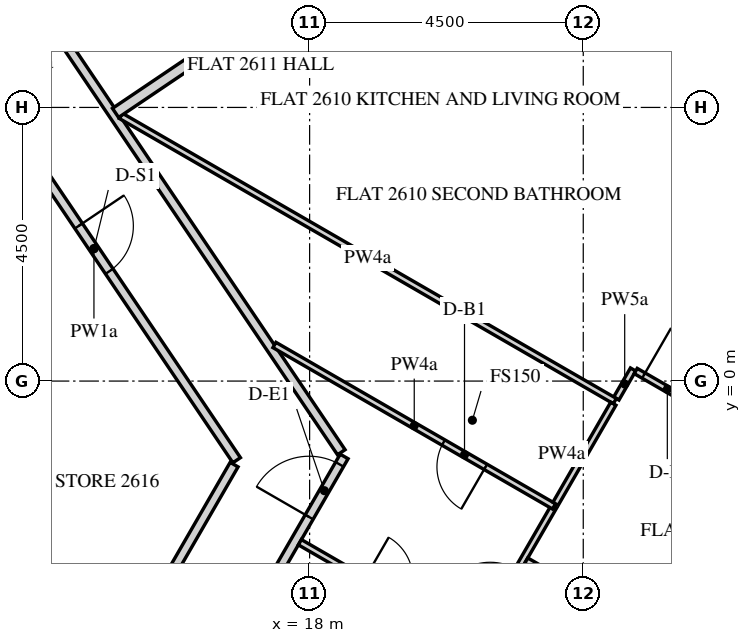
"""IFC4 building model, lengths in metres.
Left out: names, types, materials, properties, quantities, classifications, styles, units other than length and angle.
Written with IfcOpenShell. Run it as: python <this file> out.ifc"""

import sys

from ifc_helpers import new_model, si_unit, direction, frame, frame_2d, origin, place, context, subcontext, project, spatial, polyline, rectangle, outline, extrude, element, fill, save


model = new_model("IFC4")
c1 = context("Model", 3, precision=1e-05, world=origin(), true_north=direction((0.0, 1.0)))
c2 = subcontext(c1, "Body", "Model", "MODEL_VIEW")
j1 = project(units=[si_unit("LENGTHUNIT", "METRE"), si_unit("PLANEANGLEUNIT", "RADIAN")], contexts=[c1])
p1 = place(None, origin())
s1 = spatial("IfcSite", under=j1, at=p1, CompositionType="ELEMENT")
p2 = place(p1, origin())
s2 = spatial("IfcBuilding", under=s1, at=p2, CompositionType="ELEMENT")
p3 = place(p2, frame((0.0, 0.0, 326.4)))
s3 = spatial("IfcBuildingStorey", under=s2, at=p3, CompositionType="ELEMENT", Elevation=326.4)
p4 = place(p3, frame((16.451, -23.005, -0.15), z_axis=(0.0, 0.0, 1.0), x_axis=(0.500003737743, 0.866023245787, 0.0)))
e1 = element("IfcWall", 1, at=p4, inside=s3, PredefinedType="SOLIDWALL", context=c2, shape_type="SweptSolid", body=[
    extrude(outline(polyline([(-0.021, -0.25), (25.468, -0.25), (25.421, 0.25), (0.021, 0.25), (-0.021, -0.25)])), origin(), (0.0, 0.0, 1.0), 3.9),
])
p5 = place(p4, frame((2.522, 0.0, 0.75)))
e2 = element("IfcOpeningElement", 2, at=p5, cuts=e1, PredefinedType="OPENING", context=c2, shape_type="SweptSolid", body=[
    extrude(rectangle(XDim=2.4, YDim=2.7, at=frame_2d((1.2, 1.35))), frame((0.0, 0.26, 0.0), z_axis=(0.0, -1.0, 0.0), x_axis=(1.0, 0.0, 0.0)), (0.0, 0.0, 1.0), 0.52),
])
p6 = place(p4, frame((6.122, 0.0, 0.75)))
e3 = element("IfcOpeningElement", 3, at=p6, cuts=e1, PredefinedType="OPENING", context=c2, shape_type="SweptSolid", body=[
    extrude(rectangle(XDim=2.4, YDim=2.7, at=frame_2d((1.2, 1.35))), frame((0.0, 0.26, 0.0), z_axis=(0.0, -1.0, 0.0), x_axis=(1.0, 0.0, 0.0)), (0.0, 0.0, 1.0), 0.52),
])
p7 = place(p4, frame((9.722, 0.0, 0.75)))
e4 = element("IfcOpeningElement", 4, at=p7, cuts=e1, PredefinedType="OPENING", context=c2, shape_type="SweptSolid", body=[
    extrude(rectangle(XDim=2.4, YDim=2.7, at=frame_2d((1.2, 1.35))), frame((0.0, 0.26, 0.0), z_axis=(0.0, -1.0, 0.0), x_axis=(1.0, 0.0, 0.0)), (0.0, 0.0, 1.0), 0.52),
])
p8 = place(p4, frame((13.323, 0.0, 0.75)))
e5 = element("IfcOpeningElement", 5, at=p8, cuts=e1, PredefinedType="OPENING", context=c2, shape_type="SweptSolid", body=[
    extrude(rectangle(XDim=2.4, YDim=2.7, at=frame_2d((1.2, 1.35))), frame((0.0, 0.26, 0.0), z_axis=(0.0, -1.0, 0.0), x_axis=(1.0, 0.0, 0.0)), (0.0, 0.0, 1.0), 0.52),
])
p9 = place(p4, frame((16.922, 0.0, 0.75)))
e6 = element("IfcOpeningElement", 6, at=p9, cuts=e1, PredefinedType="OPENING", context=c2, shape_type="SweptSolid", body=[
    extrude(rectangle(XDim=2.4, YDim=2.7, at=frame_2d((1.2, 1.35))), frame((0.0, 0.26, 0.0), z_axis=(0.0, -1.0, 0.0), x_axis=(1.0, 0.0, 0.0)), (0.0, 0.0, 1.0), 0.52),
])
p10 = place(p4, frame((20.522, 0.0, 0.75)))
e7 = element("IfcOpeningElement", 7, at=p10, cuts=e1, PredefinedType="OPENING", context=c2, shape_type="SweptSolid", body=[
    extrude(rectangle(XDim=2.4, YDim=2.7, at=frame_2d((1.2, 1.35))), frame((0.0, 0.26, 0.0), z_axis=(0.0, -1.0, 0.0), x_axis=(1.0, 0.0, 0.0)), (0.0, 0.0, 1.0), 0.52),
])
p11 = place(p3, frame((26.706, 2.879, -0.15), z_axis=(0.0, 0.0, 1.0), x_axis=(-0.559197891507, 0.829034208061, 0.0)))
e8 = element("IfcWall", 8, at=p11, inside=s3, PredefinedType="SOLIDWALL", context=c2, shape_type="SweptSolid", body=[
    extrude(outline(polyline([(0.25, -0.25), (22.795, -0.25), (23.295, 0.25), (-0.25, 0.25), (0.25, -0.25)])), origin(), (0.0, 0.0, 1.0), 3.9),
])
p12 = place(p11, frame((1.323, 0.0, 1.05)))
e9 = element("IfcOpeningElement", 9, at=p12, cuts=e8, PredefinedType="OPENING", context=c2, shape_type="SweptSolid", body=[
    extrude(rectangle(XDim=0.9, YDim=1.5, at=frame_2d((0.45, 0.75))), frame((0.0, 0.26, 0.0), z_axis=(0.0, -1.0, 0.0), x_axis=(1.0, 0.0, 0.0)), (0.0, 0.0, 1.0), 0.52),
])
p13 = place(p11, frame((2.522, 0.0, 0.15)))
e10 = element("IfcOpeningElement", 10, at=p13, cuts=e8, PredefinedType="OPENING", context=c2, shape_type="SweptSolid", body=[
    extrude(rectangle(XDim=1.2, YDim=2.4, at=frame_2d((0.6, 1.2))), frame((0.0, 0.26, 0.0), z_axis=(0.0, -1.0, 0.0), x_axis=(1.0, 0.0, 0.0)), (0.0, 0.0, 1.0), 0.52),
])
p14 = place(p11, frame((4.922, 0.0, 1.05)))
e11 = element("IfcOpeningElement", 11, at=p14, cuts=e8, PredefinedType="OPENING", context=c2, shape_type="SweptSolid", body=[
    extrude(rectangle(XDim=0.9, YDim=1.5, at=frame_2d((0.45, 0.75))), frame((0.0, 0.26, 0.0), z_axis=(0.0, -1.0, 0.0), x_axis=(1.0, 0.0, 0.0)), (0.0, 0.0, 1.0), 0.52),
])
p15 = place(p11, frame((6.122, 0.0, 0.15)))
e12 = element("IfcOpeningElement", 12, at=p15, cuts=e8, PredefinedType="OPENING", context=c2, shape_type="SweptSolid", body=[
    extrude(rectangle(XDim=1.2, YDim=2.4, at=frame_2d((0.6, 1.2))), frame((0.0, 0.26, 0.0), z_axis=(0.0, -1.0, 0.0), x_axis=(1.0, 0.0, 0.0)), (0.0, 0.0, 1.0), 0.52),
])
p16 = place(p11, frame((8.522, 0.0, 1.05)))
e13 = element("IfcOpeningElement", 13, at=p16, cuts=e8, PredefinedType="OPENING", context=c2, shape_type="SweptSolid", body=[
    extrude(rectangle(XDim=0.9, YDim=1.5, at=frame_2d((0.45, 0.75))), frame((0.0, 0.26, 0.0), z_axis=(0.0, -1.0, 0.0), x_axis=(1.0, 0.0, 0.0)), (0.0, 0.0, 1.0), 0.52),
])
p17 = place(p11, frame((9.722, 0.0, 0.15)))
e14 = element("IfcOpeningElement", 14, at=p17, cuts=e8, PredefinedType="OPENING", context=c2, shape_type="SweptSolid", body=[
    extrude(rectangle(XDim=1.2, YDim=2.4, at=frame_2d((0.6, 1.2))), frame((0.0, 0.26, 0.0), z_axis=(0.0, -1.0, 0.0), x_axis=(1.0, 0.0, 0.0)), (0.0, 0.0, 1.0), 0.52),
])
p18 = place(p11, frame((12.122, 0.0, 1.05)))
e15 = element("IfcOpeningElement", 15, at=p18, cuts=e8, PredefinedType="OPENING", context=c2, shape_type="SweptSolid", body=[
    extrude(rectangle(XDim=0.9, YDim=1.5, at=frame_2d((0.45, 0.75))), frame((0.0, 0.26, 0.0), z_axis=(0.0, -1.0, 0.0), x_axis=(1.0, 0.0, 0.0)), (0.0, 0.0, 1.0), 0.52),
])
p19 = place(p11, frame((13.323, 0.0, 0.15)))
e16 = element("IfcOpeningElement", 16, at=p19, cuts=e8, PredefinedType="OPENING", context=c2, shape_type="SweptSolid", body=[
    extrude(rectangle(XDim=1.2, YDim=2.4, at=frame_2d((0.6, 1.2))), frame((0.0, 0.26, 0.0), z_axis=(0.0, -1.0, 0.0), x_axis=(1.0, 0.0, 0.0)), (0.0, 0.0, 1.0), 0.52),
])
p20 = place(p11, frame((15.722, 0.0, 1.05)))
e17 = element("IfcOpeningElement", 17, at=p20, cuts=e8, PredefinedType="OPENING", context=c2, shape_type="SweptSolid", body=[
    extrude(rectangle(XDim=0.9, YDim=1.5, at=frame_2d((0.45, 0.75))), frame((0.0, 0.26, 0.0), z_axis=(0.0, -1.0, 0.0), x_axis=(1.0, 0.0, 0.0)), (0.0, 0.0, 1.0), 0.52),
])
p21 = place(p11, frame((16.922, 0.0, 0.15)))
e18 = element("IfcOpeningElement", 18, at=p21, cuts=e8, PredefinedType="OPENING", context=c2, shape_type="SweptSolid", body=[
    extrude(rectangle(XDim=1.2, YDim=2.4, at=frame_2d((0.6, 1.2))), frame((0.0, 0.26, 0.0), z_axis=(0.0, -1.0, 0.0), x_axis=(1.0, 0.0, 0.0)), (0.0, 0.0, 1.0), 0.52),
])
p22 = place(p11, frame((19.323, 0.0, 1.05)))
e19 = element("IfcOpeningElement", 19, at=p22, cuts=e8, PredefinedType="OPENING", context=c2, shape_type="SweptSolid", body=[
    extrude(rectangle(XDim=0.9, YDim=1.5, at=frame_2d((0.45, 0.75))), frame((0.0, 0.26, 0.0), z_axis=(0.0, -1.0, 0.0), x_axis=(1.0, 0.0, 0.0)), (0.0, 0.0, 1.0), 0.52),
])
p23 = place(p11, frame((20.522, 0.0, 0.15)))
e20 = element("IfcOpeningElement", 20, at=p23, cuts=e8, PredefinedType="OPENING", context=c2, shape_type="SweptSolid", body=[
    extrude(rectangle(XDim=1.2, YDim=2.4, at=frame_2d((0.6, 1.2))), frame((0.0, 0.26, 0.0), z_axis=(0.0, -1.0, 0.0), x_axis=(1.0, 0.0, 0.0)), (0.0, 0.0, 1.0), 0.52),
])
p24 = place(p3, frame((11.229, -13.951, 0.0), z_axis=(0.0, 0.0, 1.0), x_axis=(0.499997948852, 0.866026588012, 0.0)))
e21 = element("IfcWall", 21, at=p24, inside=s3, PredefinedType="PARTITIONING", context=c2, shape_type="SweptSolid", body=[
    extrude(rectangle(XDim=14.677, YDim=0.15, at=frame_2d((7.339, 0.0))), origin(), (0.0, 0.0, 1.0), 2.838),
])
p25 = place(p24, frame((0.4, 0.0, 0.0)))
e22 = element("IfcOpeningElement", 22, at=p25, cuts=e21, PredefinedType="OPENING", context=c2, shape_type="SweptSolid", body=[
    extrude(rectangle(XDim=1.0, YDim=2.1, at=frame_2d((0.5, 1.05))), frame((0.0, 0.085, 0.0), z_axis=(0.0, -1.0, 0.0), x_axis=(1.0, 0.0, 0.0)), (0.0, 0.0, 1.0), 0.17),
])
p26 = place(p24, frame((13.527, 0.0, 0.0)))
e23 = element("IfcOpeningElement", 23, at=p26, cuts=e21, PredefinedType="OPENING", context=c2, shape_type="SweptSolid", body=[
    extrude(rectangle(XDim=1.0, YDim=2.1, at=frame_2d((0.5, 1.05))), frame((0.0, 0.085, 0.0), z_axis=(0.0, -1.0, 0.0), x_axis=(1.0, 0.0, 0.0)), (0.0, 0.0, 1.0), 0.17),
])
p27 = place(p3, frame((18.521, -1.171, 0.0), z_axis=(0.0, 0.0, 1.0), x_axis=(-0.559191021435, 0.829038842001, 0.0)))
e24 = element("IfcWall", 24, at=p27, inside=s3, PredefinedType="PARTITIONING", context=c2, shape_type="SweptSolid", body=[
    extrude(rectangle(XDim=16.605, YDim=0.15, at=frame_2d((8.303, 0.0))), origin(), (0.0, 0.0, 1.0), 2.838),
])
p28 = place(p27, frame((9.703, 0.0, 0.0)))
e25 = element("IfcOpeningElement", 25, at=p28, cuts=e24, PredefinedType="OPENING", context=c2, shape_type="SweptSolid", body=[
    extrude(rectangle(XDim=1.0, YDim=2.1, at=frame_2d((0.5, 1.05))), frame((0.0, 0.085, 0.0), z_axis=(0.0, -1.0, 0.0), x_axis=(1.0, 0.0, 0.0)), (0.0, 0.0, 1.0), 0.17),
])
p29 = place(p3, frame((12.106, 5.657, 0.0), z_axis=(0.0, 0.0, 1.0), x_axis=(0.559202573837, -0.829031049728, 0.0)))
e26 = element("IfcWall", 26, at=p29, inside=s3, PredefinedType="PARTITIONING", context=c2, shape_type="SweptSolid", body=[
    extrude(rectangle(XDim=8.394, YDim=0.15, at=frame_2d((4.197, 0.0))), origin(), (0.0, 0.0, 1.0), 2.838),
])
p30 = place(p29, frame((3.747, 0.0, 0.0)))
e27 = element("IfcOpeningElement", 27, at=p30, cuts=e26, PredefinedType="OPENING", context=c2, shape_type="SweptSolid", body=[
    extrude(rectangle(XDim=0.9, YDim=2.1, at=frame_2d((0.45, 1.05))), frame((0.0, 0.085, 0.0), z_axis=(0.0, -1.0, 0.0), x_axis=(1.0, 0.0, 0.0)), (0.0, 0.0, 1.0), 0.17),
])
p31 = place(p3, frame((16.758, -1.374, 0.0), z_axis=(0.0, 0.0, 1.0), x_axis=(-0.499980689202, -0.866036552592, 0.0)))
e28 = element("IfcWall", 28, at=p31, inside=s3, PredefinedType="PARTITIONING", context=c2, shape_type="SweptSolid", body=[
    extrude(rectangle(XDim=6.111, YDim=0.15, at=frame_2d((3.055, 0.0))), origin(), (0.0, 0.0, 1.0), 2.838),
])
p32 = place(p3, frame((23.043, -0.287, 0.0), z_axis=(0.0, 0.0, 1.0), x_axis=(0.500181810019, 0.865920410272, 0.0)))
e29 = element("IfcWall", 29, at=p32, inside=s3, PredefinedType="PARTITIONING", context=c2, shape_type="SweptSolid", body=[
    extrude(rectangle(XDim=0.552, YDim=0.1, at=frame_2d((0.276, 0.0))), origin(), (0.0, 0.0, 1.0), 2.838),
])
p33 = place(p3, frame((23.363, 0.166, 0.0), z_axis=(0.0, 0.0, 1.0), x_axis=(0.866024483152, -0.500001594578, 0.0)))
e30 = element("IfcWall", 30, at=p33, inside=s3, PredefinedType="PARTITIONING", context=c2, shape_type="SweptSolid", body=[
    extrude(rectangle(XDim=5.35, YDim=0.1, at=frame_2d((2.675, 0.0))), origin(), (0.0, 0.0, 1.0), 2.838),
])
p34 = place(p33, frame((0.15, 0.0, 0.0)))
e31 = element("IfcOpeningElement", 31, at=p34, cuts=e30, PredefinedType="OPENING", context=c2, shape_type="SweptSolid", body=[
    extrude(rectangle(XDim=0.9, YDim=2.1, at=frame_2d((0.45, 1.05))), frame((0.0, 0.06, 0.0), z_axis=(0.0, -1.0, 0.0), x_axis=(1.0, 0.0, 0.0)), (0.0, 0.0, 1.0), 0.12),
])
p35 = place(p3, frame((14.896, 4.361, 0.0), z_axis=(0.0, 0.0, 1.0), x_axis=(0.866020874699, -0.500007844523, 0.0)))
e32 = element("IfcWall", 32, at=p35, inside=s3, PredefinedType="PARTITIONING", context=c2, shape_type="SweptSolid", body=[
    extrude(rectangle(XDim=9.38, YDim=0.1, at=frame_2d((4.69, 0.0))), origin(), (0.0, 0.0, 1.0), 2.838),
])
p36 = place(p3, frame((22.069, 9.307, 0.0), z_axis=(0.0, 0.0, 1.0), x_axis=(-0.829040270775, -0.559188903174, 0.0)))
e33 = element("IfcWall", 33, at=p36, inside=s3, PredefinedType="PARTITIONING", context=c2, shape_type="SweptSolid", body=[
    extrude(rectangle(XDim=8.758, YDim=0.18, at=frame_2d((4.379, 0.0))), origin(), (0.0, 0.0, 1.0), 2.838),
])
p37 = place(p3, frame((17.84, -2.65, 0.0), z_axis=(0.0, 0.0, 1.0), x_axis=(0.866002163101, -0.500040251884, 0.0)))
e34 = element("IfcWall", 34, at=p37, inside=s3, PredefinedType="PARTITIONING", context=c2, shape_type="SweptSolid", body=[
    extrude(rectangle(XDim=3.325, YDim=0.1, at=frame_2d((1.663, 0.0))), origin(), (0.0, 0.0, 1.0), 2.838),
])
p38 = place(p37, frame((1.225, 0.0, 0.0)))
e35 = element("IfcOpeningElement", 35, at=p38, cuts=e34, PredefinedType="OPENING", context=c2, shape_type="SweptSolid", body=[
    extrude(rectangle(XDim=0.8, YDim=2.1, at=frame_2d((0.4, 1.05))), frame((0.0, 0.06, 0.0), z_axis=(0.0, -1.0, 0.0), x_axis=(1.0, 0.0, 0.0)), (0.0, 0.0, 1.0), 0.12),
])
p39 = place(p3, frame((20.743, -4.271, 0.0), z_axis=(0.0, 0.0, 1.0), x_axis=(0.500014808323, 0.866016854026, 0.0)))
e36 = element("IfcWall", 36, at=p39, inside=s3, PredefinedType="PARTITIONING", context=c2, shape_type="SweptSolid", body=[
    extrude(rectangle(XDim=2.554, YDim=0.1, at=frame_2d((1.277, 0.0))), origin(), (0.0, 0.0, 1.0), 2.838),
])
p40 = place(p39, frame((0.452, 0.0, 0.0)))
e37 = element("IfcOpeningElement", 37, at=p40, cuts=e36, PredefinedType="OPENING", context=c2, shape_type="SweptSolid", body=[
    extrude(rectangle(XDim=0.9, YDim=2.1, at=frame_2d((0.45, 1.05))), frame((0.0, 0.06, 0.0), z_axis=(0.0, -1.0, 0.0), x_axis=(1.0, 0.0, 0.0)), (0.0, 0.0, 1.0), 0.12),
])
p41 = place(p3, frame((22.02, -2.061, 0.0), z_axis=(0.0, 0.0, 1.0), x_axis=(-0.866041630335, 0.499971893737, 0.0)))
e38 = element("IfcWall", 38, at=p41, inside=s3, PredefinedType="PARTITIONING", context=c2, shape_type="SweptSolid", body=[
    extrude(rectangle(XDim=5.309, YDim=0.1, at=frame_2d((2.655, 0.0))), origin(), (0.0, 0.0, 1.0), 2.838),
])
p42 = place(p41, frame((1.3, 0.0, 0.0)))
e39 = element("IfcOpeningElement", 39, at=p42, cuts=e38, PredefinedType="OPENING", context=c2, shape_type="SweptSolid", body=[
    extrude(rectangle(XDim=0.8, YDim=2.1, at=frame_2d((0.4, 1.05))), frame((0.0, 0.06, 0.0), z_axis=(0.0, -1.0, 0.0), x_axis=(1.0, 0.0, 0.0)), (0.0, 0.0, 1.0), 0.12),
])
p43 = place(p3, frame((26.196, -5.627, 0.0), z_axis=(0.0, 0.0, 1.0), x_axis=(-0.866024483152, 0.500001594578, 0.0)))
e40 = element("IfcWall", 40, at=p43, inside=s3, PredefinedType="PARTITIONING", context=c2, shape_type="SweptSolid", body=[
    extrude(rectangle(XDim=5.35, YDim=0.1, at=frame_2d((2.675, 0.0))), origin(), (0.0, 0.0, 1.0), 2.838),
])
p44 = place(p43, frame((4.3, 0.0, 0.0)))
e41 = element("IfcOpeningElement", 41, at=p44, cuts=e40, PredefinedType="OPENING", context=c2, shape_type="SweptSolid", body=[
    extrude(rectangle(XDim=0.9, YDim=2.1, at=frame_2d((0.45, 1.05))), frame((0.0, 0.06, 0.0), z_axis=(0.0, -1.0, 0.0), x_axis=(1.0, 0.0, 0.0)), (0.0, 0.0, 1.0), 0.12),
])
p45 = place(p3, frame((22.995, -0.372, 0.0), z_axis=(0.0, 0.0, 1.0), x_axis=(-0.500063520245, -0.865988727248, 0.0)))
e42 = element("IfcWall", 42, at=p45, inside=s3, PredefinedType="PARTITIONING", context=c2, shape_type="SweptSolid", body=[
    extrude(rectangle(XDim=1.9, YDim=0.1, at=frame_2d((0.95, 0.0))), origin(), (0.0, 0.0, 1.0), 2.838),
])
p46 = place(p26, origin())
e43 = element("IfcDoor", 43, at=p46, inside=s3, OperationType="SINGLE_SWING_LEFT", PredefinedType="DOOR", context=c2, shape_type="SweptSolid", body=[
    extrude(rectangle(XDim=1.0, YDim=2.1, at=frame_2d((0.5, 1.05))), frame((0.0, 0.025, 0.0), z_axis=(0.0, -1.0, 0.0), x_axis=(1.0, 0.0, 0.0)), (0.0, 0.0, 1.0), 0.05),
])
fill(e23, e43)
p47 = place(p34, origin())
e44 = element("IfcDoor", 44, at=p47, inside=s3, OperationType="SINGLE_SWING_RIGHT", PredefinedType="DOOR", context=c2, shape_type="SweptSolid", body=[
    extrude(rectangle(XDim=0.9, YDim=2.1, at=frame_2d((0.45, 1.05))), frame((0.0, 0.025, 0.0), z_axis=(0.0, -1.0, 0.0), x_axis=(1.0, 0.0, 0.0)), (0.0, 0.0, 1.0), 0.05),
])
fill(e31, e44)
p48 = place(p42, origin())
e45 = element("IfcDoor", 45, at=p48, inside=s3, OperationType="SINGLE_SWING_RIGHT", PredefinedType="DOOR", context=c2, shape_type="SweptSolid", body=[
    extrude(rectangle(XDim=0.8, YDim=2.1, at=frame_2d((0.4, 1.05))), frame((0.0, 0.025, 0.0), z_axis=(0.0, -1.0, 0.0), x_axis=(1.0, 0.0, 0.0)), (0.0, 0.0, 1.0), 0.05),
])
fill(e39, e45)
p49 = place(p30, origin())
e46 = element("IfcDoor", 46, at=p49, inside=s3, OperationType="SINGLE_SWING_RIGHT", PredefinedType="DOOR", context=c2, shape_type="SweptSolid", body=[
    extrude(rectangle(XDim=0.9, YDim=2.1, at=frame_2d((0.45, 1.05))), frame((0.0, 0.025, 0.0), z_axis=(0.0, -1.0, 0.0), x_axis=(1.0, 0.0, 0.0)), (0.0, 0.0, 1.0), 0.05),
])
fill(e27, e46)
save(model, sys.argv[1])
